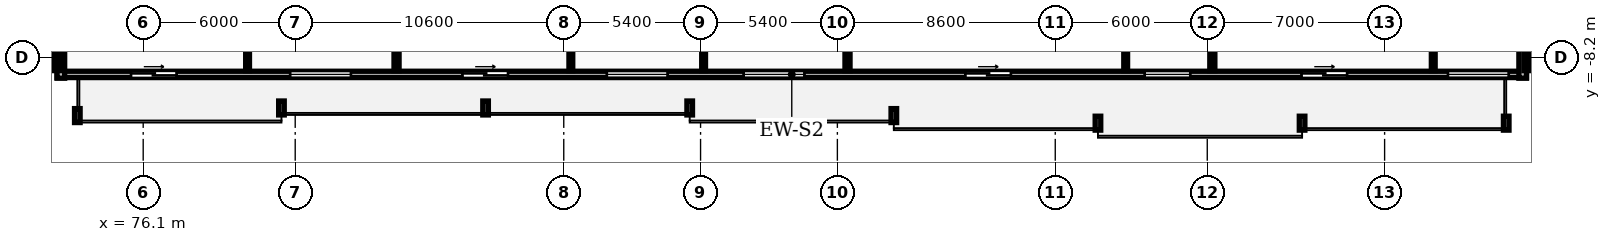
"""IFC4 building model, lengths in metres.
Left out: names, types, materials, properties, quantities, classifications, styles, units other than length and angle.
Written with IfcOpenShell. Run it as: python <this file> out.ifc"""

import sys

from ifc_helpers import new_model, si_unit, direction, frame, frame_2d, origin, place, context, subcontext, project, spatial, rectangle, extrude, element, fill, save


model = new_model("IFC4")
c1 = context("Model", 3, precision=1e-05, world=origin(), true_north=direction((0.0, 1.0)))
c2 = subcontext(c1, "Body", "Model", "MODEL_VIEW")
j1 = project(units=[si_unit("LENGTHUNIT", "METRE"), si_unit("PLANEANGLEUNIT", "RADIAN")], contexts=[c1])
p1 = place(None, origin())
s1 = spatial("IfcSite", under=j1, at=p1, CompositionType="ELEMENT")
p2 = place(p1, origin())
s2 = spatial("IfcBuilding", under=s1, at=p2, CompositionType="ELEMENT")
p3 = place(p2, frame((0.0, 0.0, 87.3)))
s3 = spatial("IfcBuildingStorey", under=s2, at=p3, CompositionType="ELEMENT", Elevation=87.3)
p4 = place(p3, frame((72.7, -8.85, 0.0), z_axis=(0.0, 0.0, 1.0), x_axis=(1.0, 0.0, 0.0)))
e1 = element("IfcWall", 1, at=p4, inside=s3, PredefinedType="STANDARD", context=c2, shape_type="SweptSolid", body=[
    extrude(rectangle(XDim=58.0, YDim=0.25, at=frame_2d((29.0, 0.0))), origin(), (0.0, 0.0, 1.0), 2.97),
])
p5 = place(p4, frame((2.92, 0.0, 0.0)))
e2 = element("IfcOpeningElement", 2, at=p5, cuts=e1, PredefinedType="OPENING", context=c2, shape_type="SweptSolid", body=[
    extrude(rectangle(XDim=1.8, YDim=2.2, at=frame_2d((0.9, 1.1))), frame((0.0, 0.135, 0.0), z_axis=(0.0, -1.0, 0.0), x_axis=(1.0, 0.0, 0.0)), (0.0, 0.0, 1.0), 0.27),
])
p6 = place(p4, frame((9.2, 0.0, 0.85)))
e3 = element("IfcOpeningElement", 3, at=p6, cuts=e1, PredefinedType="OPENING", context=c2, shape_type="SweptSolid", body=[
    extrude(rectangle(XDim=2.4, YDim=1.9, at=frame_2d((1.2, 0.95))), frame((0.0, 0.135, 0.0), z_axis=(0.0, -1.0, 0.0), x_axis=(1.0, 0.0, 0.0)), (0.0, 0.0, 1.0), 0.27),
])
p7 = place(p4, frame((21.7, 0.0, 0.85)))
e4 = element("IfcOpeningElement", 4, at=p7, cuts=e1, PredefinedType="OPENING", context=c2, shape_type="SweptSolid", body=[
    extrude(rectangle(XDim=2.4, YDim=1.9, at=frame_2d((1.2, 0.95))), frame((0.0, 0.135, 0.0), z_axis=(0.0, -1.0, 0.0), x_axis=(1.0, 0.0, 0.0)), (0.0, 0.0, 1.0), 0.27),
])
p8 = place(p4, frame((16.0, 0.0, 0.0)))
e5 = element("IfcOpeningElement", 5, at=p8, cuts=e1, PredefinedType="OPENING", context=c2, shape_type="SweptSolid", body=[
    extrude(rectangle(XDim=1.8, YDim=2.2, at=frame_2d((0.9, 1.1))), frame((0.0, 0.135, 0.0), z_axis=(0.0, -1.0, 0.0), x_axis=(1.0, 0.0, 0.0)), (0.0, 0.0, 1.0), 0.27),
])
p9 = place(p4, frame((27.1, 0.0, 0.85)))
e6 = element("IfcOpeningElement", 6, at=p9, cuts=e1, PredefinedType="OPENING", context=c2, shape_type="SweptSolid", body=[
    extrude(rectangle(XDim=2.4, YDim=1.9, at=frame_2d((1.2, 0.95))), frame((0.0, 0.135, 0.0), z_axis=(0.0, -1.0, 0.0), x_axis=(1.0, 0.0, 0.0)), (0.0, 0.0, 1.0), 0.27),
])
p10 = place(p4, frame((35.85, 0.0, 0.0)))
e7 = element("IfcOpeningElement", 7, at=p10, cuts=e1, PredefinedType="OPENING", context=c2, shape_type="SweptSolid", body=[
    extrude(rectangle(XDim=1.8, YDim=2.2, at=frame_2d((0.9, 1.1))), frame((0.0, 0.135, 0.0), z_axis=(0.0, -1.0, 0.0), x_axis=(1.0, 0.0, 0.0)), (0.0, 0.0, 1.0), 0.27),
])
p11 = place(p4, frame((42.93, 0.0, 0.85)))
e8 = element("IfcOpeningElement", 8, at=p11, cuts=e1, PredefinedType="OPENING", context=c2, shape_type="SweptSolid", body=[
    extrude(rectangle(XDim=1.8, YDim=1.8, at=frame_2d((0.9, 0.9))), frame((0.0, 0.135, 0.0), z_axis=(0.0, -1.0, 0.0), x_axis=(1.0, 0.0, 0.0)), (0.0, 0.0, 1.0), 0.27),
])
p12 = place(p4, frame((49.12, 0.0, 0.0)))
e9 = element("IfcOpeningElement", 9, at=p12, cuts=e1, PredefinedType="OPENING", context=c2, shape_type="SweptSolid", body=[
    extrude(rectangle(XDim=1.8, YDim=2.2, at=frame_2d((0.9, 1.1))), frame((0.0, 0.135, 0.0), z_axis=(0.0, -1.0, 0.0), x_axis=(1.0, 0.0, 0.0)), (0.0, 0.0, 1.0), 0.27),
])
p13 = place(p4, frame((54.9, 0.0, 0.85)))
e10 = element("IfcOpeningElement", 10, at=p13, cuts=e1, PredefinedType="OPENING", context=c2, shape_type="SweptSolid", body=[
    extrude(rectangle(XDim=2.4, YDim=1.9, at=frame_2d((1.2, 0.95))), frame((0.0, 0.135, 0.0), z_axis=(0.0, -1.0, 0.0), x_axis=(1.0, 0.0, 0.0)), (0.0, 0.0, 1.0), 0.27),
])
for number, where, z_axis, x_axis in (
    (11, (130.55, -9.0, 0.0), (0.0, 0.0, 1.0), (0.0, 1.0, 0.0)),
    (12, (72.85, -5.4, 0.0), (0.0, 0.0, 1.0), (0.0, -1.0, 0.0)),
):
    element("IfcWall", number, at=place(p3, frame(where, z_axis=z_axis, x_axis=x_axis)), inside=s3, PredefinedType="STANDARD", context=c2, shape_type="SweptSolid", body=[
        extrude(rectangle(XDim=3.6, YDim=0.3, at=frame_2d((1.8, 0.0))), origin(), (0.0, 0.0, 1.0), 2.97),
    ])
for number, where, z_axis, x_axis in (
    (13, (72.7, -8.7, 0.0), (0.0, 0.0, 1.0), (0.0, 1.0, 0.0)),
    (14, (130.7, -8.7, 0.0), (0.0, 0.0, 1.0), (0.0, 1.0, 0.0)),
    (15, (86.1, -8.7, 0.0), (0.0, 0.0, 1.0), (0.0, 1.0, 0.0)),
):
    element("IfcWall", number, at=place(p3, frame(where, z_axis=z_axis, x_axis=x_axis)), inside=s3, PredefinedType="PARTITIONING", context=c2, shape_type="SweptSolid", body=[
        extrude(rectangle(XDim=24.87, YDim=0.2, at=frame_2d((12.435, 0.0))), origin(), (0.0, 0.0, 1.0), 2.97),
    ])
p14 = place(p3, frame((80.22, -8.7, 0.0), z_axis=(0.0, 0.0, 1.0), x_axis=(0.0, 1.0, 0.0)))
e16 = element("IfcWall", 16, at=p14, inside=s3, PredefinedType="PARTITIONING", context=c2, shape_type="SweptSolid", body=[
    extrude(rectangle(XDim=10.31, YDim=0.15, at=frame_2d((5.155, 0.0))), origin(), (0.0, 0.0, 1.0), 2.97),
])
p15 = place(p14, frame((6.12, 0.0, 0.0)))
e17 = element("IfcOpeningElement", 17, at=p15, cuts=e16, PredefinedType="OPENING", context=c2, shape_type="SweptSolid", body=[
    extrude(rectangle(XDim=0.84, YDim=2.04, at=frame_2d((0.42, 1.02))), frame((0.0, 0.085, 0.0), z_axis=(0.0, -1.0, 0.0), x_axis=(1.0, 0.0, 0.0)), (0.0, 0.0, 1.0), 0.17),
])
p16 = place(p14, frame((8.04, 0.0, 0.0)))
e18 = element("IfcOpeningElement", 18, at=p16, cuts=e16, PredefinedType="OPENING", context=c2, shape_type="SweptSolid", body=[
    extrude(rectangle(XDim=0.84, YDim=2.04, at=frame_2d((0.42, 1.02))), frame((0.0, 0.085, 0.0), z_axis=(0.0, -1.0, 0.0), x_axis=(1.0, 0.0, 0.0)), (0.0, 0.0, 1.0), 0.17),
])
p17 = place(p14, frame((2.001, 0.0, 0.0)))
e19 = element("IfcOpeningElement", 19, at=p17, cuts=e16, PredefinedType="OPENING", context=c2, shape_type="SweptSolid", body=[
    extrude(rectangle(XDim=0.88, YDim=2.06, at=frame_2d((0.44, 1.03))), frame((0.0, 0.085, 0.0), z_axis=(0.0, -1.0, 0.0), x_axis=(1.0, 0.0, 0.0)), (0.0, 0.0, 1.0), 0.17),
])
p18 = place(p3, frame((103.9, -8.7, 0.0), z_axis=(0.0, 0.0, 1.0), x_axis=(0.0, 1.0, 0.0)))
e20 = element("IfcWall", 20, at=p18, inside=s3, PredefinedType="PARTITIONING", context=c2, shape_type="SweptSolid", body=[
    extrude(rectangle(XDim=24.87, YDim=0.2, at=frame_2d((12.435, 0.0))), origin(), (0.0, 0.0, 1.0), 2.97),
])
p19 = place(p3, frame((92.98, -8.7, 0.0), z_axis=(0.0, 0.0, 1.0), x_axis=(0.0, 1.0, 0.0)))
e21 = element("IfcWall", 21, at=p19, inside=s3, PredefinedType="PARTITIONING", context=c2, shape_type="SweptSolid", body=[
    extrude(rectangle(XDim=10.31, YDim=0.15, at=frame_2d((5.155, 0.0))), origin(), (0.0, 0.0, 1.0), 2.97),
])
p20 = place(p19, frame((6.116, 0.0, 0.0)))
e22 = element("IfcOpeningElement", 22, at=p20, cuts=e21, PredefinedType="OPENING", context=c2, shape_type="SweptSolid", body=[
    extrude(rectangle(XDim=0.92, YDim=2.08, at=frame_2d((0.46, 1.04))), frame((0.0, 0.085, 0.0), z_axis=(0.0, -1.0, 0.0), x_axis=(1.0, 0.0, 0.0)), (0.0, 0.0, 1.0), 0.17),
])
p21 = place(p3, frame((98.22, -8.7, 0.0), z_axis=(0.0, 0.0, 1.0), x_axis=(0.0, 1.0, 0.0)))
e23 = element("IfcWall", 23, at=p21, inside=s3, PredefinedType="PARTITIONING", context=c2, shape_type="SweptSolid", body=[
    extrude(rectangle(XDim=7.8, YDim=0.15, at=frame_2d((3.9, 0.0))), origin(), (0.0, 0.0, 1.0), 2.97),
])
p22 = place(p21, frame((6.116, 0.0, 0.0)))
e24 = element("IfcOpeningElement", 24, at=p22, cuts=e23, PredefinedType="OPENING", context=c2, shape_type="SweptSolid", body=[
    extrude(rectangle(XDim=0.92, YDim=2.08, at=frame_2d((0.46, 1.04))), frame((0.0, 0.085, 0.0), z_axis=(0.0, -1.0, 0.0), x_axis=(1.0, 0.0, 0.0)), (0.0, 0.0, 1.0), 0.17),
])
p23 = place(p3, frame((118.3, -8.7, 0.0), z_axis=(0.0, 0.0, 1.0), x_axis=(0.0, 1.0, 0.0)))
e25 = element("IfcWall", 25, at=p23, inside=s3, PredefinedType="PARTITIONING", context=c2, shape_type="SweptSolid", body=[
    extrude(rectangle(XDim=24.87, YDim=0.2, at=frame_2d((12.435, 0.0))), origin(), (0.0, 0.0, 1.0), 2.2),
])
p24 = place(p3, frame((114.88, -8.7, 0.0), z_axis=(0.0, 0.0, 1.0), x_axis=(0.0, 1.0, 0.0)))
e26 = element("IfcWall", 26, at=p24, inside=s3, PredefinedType="PARTITIONING", context=c2, shape_type="SweptSolid", body=[
    extrude(rectangle(XDim=10.31, YDim=0.15, at=frame_2d((5.155, 0.0))), origin(), (0.0, 0.0, 1.0), 2.97),
])
p25 = place(p24, frame((5.55, 0.0, 0.0)))
e27 = element("IfcOpeningElement", 27, at=p25, cuts=e26, PredefinedType="OPENING", context=c2, shape_type="SweptSolid", body=[
    extrude(rectangle(XDim=0.84, YDim=2.04, at=frame_2d((0.42, 1.02))), frame((0.0, 0.085, 0.0), z_axis=(0.0, -1.0, 0.0), x_axis=(1.0, 0.0, 0.0)), (0.0, 0.0, 1.0), 0.17),
])
p26 = place(p24, frame((8.04, 0.0, 0.0)))
e28 = element("IfcOpeningElement", 28, at=p26, cuts=e26, PredefinedType="OPENING", context=c2, shape_type="SweptSolid", body=[
    extrude(rectangle(XDim=0.84, YDim=2.04, at=frame_2d((0.42, 1.02))), frame((0.0, 0.085, 0.0), z_axis=(0.0, -1.0, 0.0), x_axis=(1.0, 0.0, 0.0)), (0.0, 0.0, 1.0), 0.17),
])
p27 = place(p24, frame((3.95, 0.0, 0.0)))
e29 = element("IfcOpeningElement", 29, at=p27, cuts=e26, PredefinedType="OPENING", context=c2, shape_type="SweptSolid", body=[
    extrude(rectangle(XDim=0.88, YDim=2.06, at=frame_2d((0.44, 1.03))), frame((0.0, 0.085, 0.0), z_axis=(0.0, -1.0, 0.0), x_axis=(1.0, 0.0, 0.0)), (0.0, 0.0, 1.0), 0.17),
])
p28 = place(p3, frame((127.02, -8.7, 0.0), z_axis=(0.0, 0.0, 1.0), x_axis=(0.0, 1.0, 0.0)))
e30 = element("IfcWall", 30, at=p28, inside=s3, PredefinedType="PARTITIONING", context=c2, shape_type="SweptSolid", body=[
    extrude(rectangle(XDim=10.31, YDim=0.15, at=frame_2d((5.155, 0.0))), origin(), (0.0, 0.0, 1.0), 2.97),
])
p29 = place(p28, frame((6.12, 0.0, 0.0)))
e31 = element("IfcOpeningElement", 31, at=p29, cuts=e30, PredefinedType="OPENING", context=c2, shape_type="SweptSolid", body=[
    extrude(rectangle(XDim=0.84, YDim=2.04, at=frame_2d((0.42, 1.02))), frame((0.0, 0.085, 0.0), z_axis=(0.0, -1.0, 0.0), x_axis=(1.0, 0.0, 0.0)), (0.0, 0.0, 1.0), 0.17),
])
p30 = place(p28, frame((8.04, 0.0, 0.0)))
e32 = element("IfcOpeningElement", 32, at=p30, cuts=e30, PredefinedType="OPENING", context=c2, shape_type="SweptSolid", body=[
    extrude(rectangle(XDim=0.84, YDim=2.04, at=frame_2d((0.42, 1.02))), frame((0.0, 0.085, 0.0), z_axis=(0.0, -1.0, 0.0), x_axis=(1.0, 0.0, 0.0)), (0.0, 0.0, 1.0), 0.17),
])
p31 = place(p28, frame((2.001, 0.0, 0.0)))
e33 = element("IfcOpeningElement", 33, at=p31, cuts=e30, PredefinedType="OPENING", context=c2, shape_type="SweptSolid", body=[
    extrude(rectangle(XDim=0.88, YDim=2.06, at=frame_2d((0.44, 1.03))), frame((0.0, 0.085, 0.0), z_axis=(0.0, -1.0, 0.0), x_axis=(1.0, 0.0, 0.0)), (0.0, 0.0, 1.0), 0.17),
])
p32 = place(p5, origin())
e34 = element("IfcDoor", 34, at=p32, inside=s3, OperationType="SLIDING_TO_RIGHT", PredefinedType="DOOR", context=c2, shape_type="SweptSolid", body=[
    extrude(rectangle(XDim=1.8, YDim=2.2, at=frame_2d((0.9, 1.1))), frame((0.0, 0.025, 0.0), z_axis=(0.0, -1.0, 0.0), x_axis=(1.0, 0.0, 0.0)), (0.0, 0.0, 1.0), 0.05),
])
fill(e2, e34)
p33 = place(p6, origin())
e35 = element("IfcWindow", 35, at=p33, inside=s3, PartitioningType="DOUBLE_PANEL_VERTICAL", PredefinedType="WINDOW", context=c2, shape_type="SweptSolid", body=[
    extrude(rectangle(XDim=2.4, YDim=1.9, at=frame_2d((1.2, 0.95))), frame((0.0, 0.03, 0.0), z_axis=(0.0, -1.0, 0.0), x_axis=(1.0, 0.0, 0.0)), (0.0, 0.0, 1.0), 0.06),
])
fill(e3, e35)
p34 = place(p7, origin())
e36 = element("IfcWindow", 36, at=p34, inside=s3, PartitioningType="DOUBLE_PANEL_VERTICAL", PredefinedType="WINDOW", context=c2, shape_type="SweptSolid", body=[
    extrude(rectangle(XDim=2.4, YDim=1.9, at=frame_2d((1.2, 0.95))), frame((0.0, 0.03, 0.0), z_axis=(0.0, -1.0, 0.0), x_axis=(1.0, 0.0, 0.0)), (0.0, 0.0, 1.0), 0.06),
])
fill(e4, e36)
p35 = place(p8, origin())
e37 = element("IfcDoor", 37, at=p35, inside=s3, OperationType="SLIDING_TO_RIGHT", PredefinedType="DOOR", context=c2, shape_type="SweptSolid", body=[
    extrude(rectangle(XDim=1.8, YDim=2.2, at=frame_2d((0.9, 1.1))), frame((0.0, 0.025, 0.0), z_axis=(0.0, -1.0, 0.0), x_axis=(1.0, 0.0, 0.0)), (0.0, 0.0, 1.0), 0.05),
])
fill(e5, e37)
p36 = place(p9, origin())
e38 = element("IfcWindow", 38, at=p36, inside=s3, PartitioningType="DOUBLE_PANEL_VERTICAL", PredefinedType="WINDOW", context=c2, shape_type="SweptSolid", body=[
    extrude(rectangle(XDim=2.4, YDim=1.9, at=frame_2d((1.2, 0.95))), frame((0.0, 0.03, 0.0), z_axis=(0.0, -1.0, 0.0), x_axis=(1.0, 0.0, 0.0)), (0.0, 0.0, 1.0), 0.06),
])
fill(e6, e38)
p37 = place(p10, origin())
e39 = element("IfcDoor", 39, at=p37, inside=s3, OperationType="SLIDING_TO_RIGHT", PredefinedType="DOOR", context=c2, shape_type="SweptSolid", body=[
    extrude(rectangle(XDim=1.8, YDim=2.2, at=frame_2d((0.9, 1.1))), frame((0.0, 0.025, 0.0), z_axis=(0.0, -1.0, 0.0), x_axis=(1.0, 0.0, 0.0)), (0.0, 0.0, 1.0), 0.05),
])
fill(e7, e39)
p38 = place(p11, origin())
e40 = element("IfcWindow", 40, at=p38, inside=s3, PartitioningType="SINGLE_PANEL", PredefinedType="WINDOW", context=c2, shape_type="SweptSolid", body=[
    extrude(rectangle(XDim=1.8, YDim=1.8, at=frame_2d((0.9, 0.9))), frame((0.0, 0.03, 0.0), z_axis=(0.0, -1.0, 0.0), x_axis=(1.0, 0.0, 0.0)), (0.0, 0.0, 1.0), 0.06),
])
fill(e8, e40)
p39 = place(p12, origin())
e41 = element("IfcDoor", 41, at=p39, inside=s3, OperationType="SLIDING_TO_RIGHT", PredefinedType="DOOR", context=c2, shape_type="SweptSolid", body=[
    extrude(rectangle(XDim=1.8, YDim=2.2, at=frame_2d((0.9, 1.1))), frame((0.0, 0.025, 0.0), z_axis=(0.0, -1.0, 0.0), x_axis=(1.0, 0.0, 0.0)), (0.0, 0.0, 1.0), 0.05),
])
fill(e9, e41)
p40 = place(p13, origin())
e42 = element("IfcWindow", 42, at=p40, inside=s3, PartitioningType="DOUBLE_PANEL_VERTICAL", PredefinedType="WINDOW", context=c2, shape_type="SweptSolid", body=[
    extrude(rectangle(XDim=2.4, YDim=1.9, at=frame_2d((1.2, 0.95))), frame((0.0, 0.03, 0.0), z_axis=(0.0, -1.0, 0.0), x_axis=(1.0, 0.0, 0.0)), (0.0, 0.0, 1.0), 0.06),
])
fill(e10, e42)
save(model, sys.argv[1])
